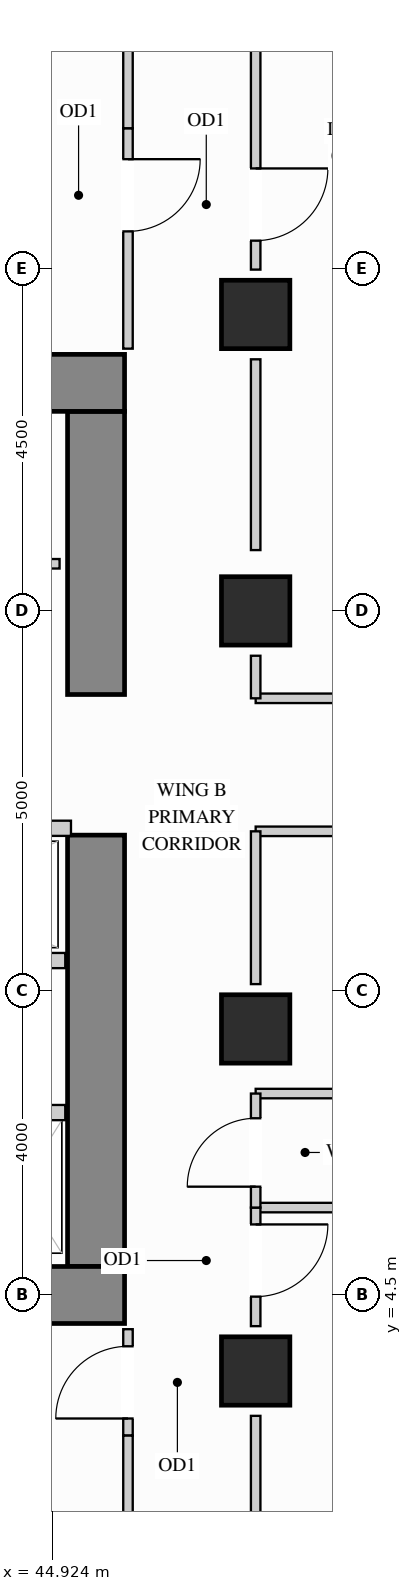
"""IFC4 building model, lengths in metres.
Left out: names, types, materials, properties, quantities, classifications, styles, units other than length and angle.
Written with IfcOpenShell. Run it as: python <this file> out.ifc"""

import sys

from ifc_helpers import new_model, si_unit, direction, frame, frame_2d, origin, origin_2d, place, context, subcontext, project, spatial, rectangle, extrude, source, transform, mapped, element, fill, save


model = new_model("IFC4")
c1 = context("Model", 3, precision=1e-05, world=origin(), true_north=direction((0.0, 1.0)))
c2 = subcontext(c1, "Body", "Model", "MODEL_VIEW")
j1 = project(units=[si_unit("LENGTHUNIT", "METRE"), si_unit("PLANEANGLEUNIT", "RADIAN")], contexts=[c1])
p1 = place(None, origin())
s1 = spatial("IfcSite", under=j1, at=p1, CompositionType="ELEMENT")
p2 = place(p1, origin())
s2 = spatial("IfcBuilding", under=s1, at=p2, CompositionType="ELEMENT")
p3 = place(p2, frame((0.0, 0.0, 95.4)))
s3 = spatial("IfcBuildingStorey", under=s2, at=p3, CompositionType="ELEMENT", Elevation=95.4)
m1 = source(origin(), c2, "Body", "SweptSolid", [
    extrude(rectangle(XDim=0.9, YDim=0.9, at=origin_2d()), origin(), (0.0, 0.0, 1.0), 3.38),
])
for number, where, z_axis, x_axis in (
    (1, (47.6, 13.5, 0.0), (0.0, 0.0, 1.0), (1.0, 0.0, 0.0)),
    (2, (47.6, 3.5, 0.0), (0.0, 0.0, 1.0), (1.0, 0.0, 0.0)),
    (3, (47.6, 8.0, 0.0), (0.0, 0.0, 1.0), (1.0, 0.0, 0.0)),
    (4, (47.6, 17.4, 0.0), (0.0, 0.0, 1.0), (1.0, 0.0, 0.0)),
):
    element("IfcColumn", number, at=place(p3, frame(where, z_axis=z_axis, x_axis=x_axis)), inside=s3, PredefinedType="COLUMN", context=c2, shape_type="MappedRepresentation", body=[
        mapped(m1, transform((0.0, 0.0, 0.0), x_axis=(1.0, 0.0, 0.0), y_axis=(0.0, 1.0, 0.0), z_axis=(0.0, 0.0, 1.0))),
    ])
m2 = source(origin(), c2, "Body", "SweptSolid", [
    extrude(rectangle(XDim=5.675, YDim=0.75, at=frame_2d((2.837, 0.0))), origin(), (0.0, 0.0, 1.0), 3.38),
])
p4 = place(p3, frame((45.5, 4.875, 0.0), z_axis=(0.0, 0.0, 1.0), x_axis=(0.0, 1.0, 0.0)))
e5 = element("IfcWall", 5, at=p4, inside=s3, PredefinedType="SHEAR", context=c2, shape_type="MappedRepresentation", body=[
    mapped(m2, transform((0.0, 0.0, 0.0), x_axis=(1.0, 0.0, 0.0), y_axis=(0.0, 1.0, 0.0), z_axis=(0.0, 0.0, 1.0))),
])
m3 = source(origin(), c2, "Body", "SweptSolid", [
    extrude(rectangle(XDim=3.725, YDim=0.75, at=frame_2d((1.863, 0.0))), origin(), (0.0, 0.0, 1.0), 3.38),
])
p5 = place(p3, frame((45.5, 12.4, 0.0), z_axis=(0.0, 0.0, 1.0), x_axis=(0.0, 1.0, 0.0)))
e6 = element("IfcWall", 6, at=p5, inside=s3, PredefinedType="SHEAR", context=c2, shape_type="MappedRepresentation", body=[
    mapped(m3, transform((0.0, 0.0, 0.0), x_axis=(1.0, 0.0, 0.0), y_axis=(0.0, 1.0, 0.0), z_axis=(0.0, 0.0, 1.0))),
])
m4 = source(origin(), c2, "Body", "SweptSolid", [
    extrude(rectangle(XDim=10.25, YDim=0.75, at=frame_2d((5.125, 0.0))), origin(), (0.0, 0.0, 1.0), 3.38),
])
for number, where, z_axis, x_axis in (
    (7, (35.625, 16.5, 0.0), (0.0, 0.0, 1.0), (1.0, 0.0, 0.0)),
    (8, (35.625, 4.5, 0.0), (0.0, 0.0, 1.0), (1.0, 0.0, 0.0)),
):
    element("IfcWall", number, at=place(p3, frame(where, z_axis=z_axis, x_axis=x_axis)), inside=s3, PredefinedType="SHEAR", context=c2, shape_type="MappedRepresentation", body=[
        mapped(m4, transform((0.0, 0.0, 0.0), x_axis=(1.0, 0.0, 0.0), y_axis=(0.0, 1.0, 0.0), z_axis=(0.0, 0.0, 1.0))),
    ])
p6 = place(p3, frame((40.75, 14.12, 0.0), z_axis=(0.0, 0.0, 1.0), x_axis=(1.0, 0.0, 0.0)))
e9 = element("IfcWall", 9, at=p6, inside=s3, PredefinedType="PARTITIONING", context=c2, shape_type="SweptSolid", body=[
    extrude(rectangle(XDim=4.27, YDim=0.125, at=frame_2d((2.135, 0.0))), origin(), (0.0, 0.0, 1.0), 3.365),
])
p7 = place(p6, frame((1.66, 0.0, 0.0)))
e10 = element("IfcOpeningElement", 10, at=p7, cuts=e9, PredefinedType="OPENING", context=c2, shape_type="SweptSolid", body=[
    extrude(rectangle(XDim=0.95, YDim=2.15, at=frame_2d((0.475, 1.075))), frame((0.0, 0.073, 0.0), z_axis=(0.0, -1.0, 0.0), x_axis=(1.0, 0.0, 0.0)), (0.0, 0.0, 1.0), 0.145),
])
m5 = source(origin(), c2, "Body", "SweptSolid", [
    extrude(rectangle(XDim=8.048, YDim=0.125, at=frame_2d((4.024, 0.0))), origin(), (0.0, 0.0, 1.0), 3.365),
])
for number, where, z_axis, x_axis in (
    (11, (47.6, 5.65, 0.0), (0.0, 0.0, 1.0), (1.0, 0.0, 0.0)),
    (12, (47.6, 7.15, 0.0), (0.0, 0.0, 1.0), (1.0, 0.0, 0.0)),
):
    element("IfcWall", number, at=place(p3, frame(where, z_axis=z_axis, x_axis=x_axis)), inside=s3, PredefinedType="PARTITIONING", context=c2, shape_type="MappedRepresentation", body=[
        mapped(m5, transform((0.0, 0.0, 0.0), x_axis=(1.0, 0.0, 0.0), y_axis=(0.0, 1.0, 0.0), z_axis=(0.0, 0.0, 1.0))),
    ])
m6 = source(origin(), c2, "Body", "SweptSolid", [
    extrude(rectangle(XDim=3.8, YDim=0.125, at=frame_2d((1.9, 0.0))), origin(), (0.0, 0.0, 1.0), 3.365),
])
p8 = place(p3, frame((47.6, 12.35, 0.0), z_axis=(0.0, 0.0, 1.0), x_axis=(1.0, 0.0, 0.0)))
e13 = element("IfcWall", 13, at=p8, inside=s3, PredefinedType="PARTITIONING", context=c2, shape_type="MappedRepresentation", body=[
    mapped(m6, transform((0.0, 0.0, 0.0), x_axis=(1.0, 0.0, 0.0), y_axis=(0.0, 1.0, 0.0), z_axis=(0.0, 0.0, 1.0))),
])
p9 = place(p3, frame((47.6, 10.6, 0.0), z_axis=(0.0, 0.0, 1.0), x_axis=(1.0, 0.0, 0.0)))
e14 = element("IfcWall", 14, at=p9, inside=s3, PredefinedType="PARTITIONING", context=c2, shape_type="SweptSolid", body=[
    extrude(rectangle(XDim=3.8, YDim=0.125, at=frame_2d((1.9, 0.0))), origin(), (0.0, 0.0, 1.0), 2.677),
])
p10 = place(p9, frame((1.425, 0.0, 0.0)))
e15 = element("IfcOpeningElement", 15, at=p10, cuts=e14, PredefinedType="OPENING", context=c2, shape_type="SweptSolid", body=[
    extrude(rectangle(XDim=0.95, YDim=2.15, at=frame_2d((0.475, 1.075))), frame((0.0, 0.073, 0.0), z_axis=(0.0, -1.0, 0.0), x_axis=(1.0, 0.0, 0.0)), (0.0, 0.0, 1.0), 0.145),
])
p11 = place(p3, frame((47.6, 4.09, 0.0), z_axis=(0.0, 0.0, 1.0), x_axis=(0.0, 1.0, 0.0)))
e16 = element("IfcWall", 16, at=p11, inside=s3, PredefinedType="PARTITIONING", context=c2, shape_type="SweptSolid", body=[
    extrude(rectangle(XDim=1.56, YDim=0.125, at=frame_2d((0.78, 0.0))), origin(), (0.0, 0.0, 1.0), 2.677),
])
p12 = place(p11, frame((0.388, 0.0, 0.0)))
e17 = element("IfcOpeningElement", 17, at=p12, cuts=e16, PredefinedType="OPENING", context=c2, shape_type="SweptSolid", body=[
    extrude(rectangle(XDim=0.95, YDim=2.15, at=frame_2d((0.475, 1.075))), frame((0.0, 0.073, 0.0), z_axis=(0.0, -1.0, 0.0), x_axis=(1.0, 0.0, 0.0)), (0.0, 0.0, 1.0), 0.145),
])
m7 = source(origin(), c2, "Body", "SweptSolid", [
    extrude(rectangle(XDim=1.72, YDim=0.125, at=frame_2d((0.86, 0.0))), origin(), (0.0, 0.0, 1.0), 2.677),
])
p13 = place(p3, frame((47.6, 1.19, 0.0), z_axis=(0.0, 0.0, 1.0), x_axis=(0.0, 1.0, 0.0)))
e18 = element("IfcWall", 18, at=p13, inside=s3, PredefinedType="PARTITIONING", context=c2, shape_type="MappedRepresentation", body=[
    mapped(m7, transform((0.0, 0.0, 0.0), x_axis=(1.0, 0.0, 0.0), y_axis=(0.0, 1.0, 0.0), z_axis=(0.0, 0.0, 1.0))),
])
m8 = source(origin(), c2, "Body", "SweptSolid", [
    extrude(rectangle(XDim=2.01, YDim=0.125, at=frame_2d((1.005, 0.0))), origin(), (0.0, 0.0, 1.0), 2.677),
])
p14 = place(p3, frame((47.6, 8.59, 0.0), z_axis=(0.0, 0.0, 1.0), x_axis=(0.0, 1.0, 0.0)))
e19 = element("IfcWall", 19, at=p14, inside=s3, PredefinedType="PARTITIONING", context=c2, shape_type="MappedRepresentation", body=[
    mapped(m8, transform((0.0, 0.0, 0.0), x_axis=(1.0, 0.0, 0.0), y_axis=(0.0, 1.0, 0.0), z_axis=(0.0, 0.0, 1.0))),
])
m9 = source(origin(), c2, "Body", "SweptSolid", [
    extrude(rectangle(XDim=2.51, YDim=0.125, at=frame_2d((1.255, 0.0))), origin(), (0.0, 0.0, 1.0), 2.677),
])
p15 = place(p3, frame((47.6, 14.3, 0.0), z_axis=(0.0, 0.0, 1.0), x_axis=(0.0, 1.0, 0.0)))
e20 = element("IfcWall", 20, at=p15, inside=s3, PredefinedType="PARTITIONING", context=c2, shape_type="MappedRepresentation", body=[
    mapped(m9, transform((0.0, 0.0, 0.0), x_axis=(1.0, 0.0, 0.0), y_axis=(0.0, 1.0, 0.0), z_axis=(0.0, 0.0, 1.0))),
])
p16 = place(p3, frame((47.6, 17.99, 0.0), z_axis=(0.0, 0.0, 1.0), x_axis=(0.0, 1.0, 0.0)))
e21 = element("IfcWall", 21, at=p16, inside=s3, PredefinedType="PARTITIONING", context=c2, shape_type="SweptSolid", body=[
    extrude(rectangle(XDim=3.32, YDim=0.125, at=frame_2d((1.66, 0.0))), origin(), (0.0, 0.0, 1.0), 2.677),
])
p17 = place(p16, frame((0.381, 0.0, 0.0)))
e22 = element("IfcOpeningElement", 22, at=p17, cuts=e21, PredefinedType="OPENING", context=c2, shape_type="SweptSolid", body=[
    extrude(rectangle(XDim=0.95, YDim=2.15, at=frame_2d((0.475, 1.075))), frame((0.0, 0.073, 0.0), z_axis=(0.0, -1.0, 0.0), x_axis=(1.0, 0.0, 0.0)), (0.0, 0.0, 1.0), 0.145),
])
m10 = source(origin(), c2, "Body", "SweptSolid", [
    extrude(rectangle(XDim=0.56, YDim=0.125, at=frame_2d((0.28, 0.0))), origin(), (0.0, 0.0, 1.0), 2.677),
])
p18 = place(p3, frame((47.6, 12.35, 0.0), z_axis=(0.0, 0.0, 1.0), x_axis=(0.0, 1.0, 0.0)))
e23 = element("IfcWall", 23, at=p18, inside=s3, PredefinedType="PARTITIONING", context=c2, shape_type="MappedRepresentation", body=[
    mapped(m10, transform((0.0, 0.0, 0.0), x_axis=(1.0, 0.0, 0.0), y_axis=(0.0, 1.0, 0.0), z_axis=(0.0, 0.0, 1.0))),
])
p19 = place(p3, frame((47.6, 5.65, 0.0), z_axis=(0.0, 0.0, 1.0), x_axis=(0.0, 1.0, 0.0)))
e24 = element("IfcWall", 24, at=p19, inside=s3, PredefinedType="PARTITIONING", context=c2, shape_type="SweptSolid", body=[
    extrude(rectangle(XDim=1.5, YDim=0.125, at=frame_2d((0.75, 0.0))), origin(), (0.0, 0.0, 1.0), 2.677),
])
p20 = place(p19, frame((0.275, 0.0, 0.0)))
e25 = element("IfcOpeningElement", 25, at=p20, cuts=e24, PredefinedType="OPENING", context=c2, shape_type="SweptSolid", body=[
    extrude(rectangle(XDim=0.9, YDim=2.15, at=frame_2d((0.45, 1.075))), frame((0.0, 0.073, 0.0), z_axis=(0.0, -1.0, 0.0), x_axis=(1.0, 0.0, 0.0)), (0.0, 0.0, 1.0), 0.145),
])
p21 = place(p3, frame((45.92, 16.95, 0.0), z_axis=(0.0, 0.0, 1.0), x_axis=(0.0, 1.0, 0.0)))
e26 = element("IfcWall", 26, at=p21, inside=s3, PredefinedType="PARTITIONING", context=c2, shape_type="SweptSolid", body=[
    extrude(rectangle(XDim=2.9, YDim=0.125, at=frame_2d((1.45, 0.0))), origin(), (0.0, 0.0, 1.0), 3.365),
])
p22 = place(p21, frame((1.543, 0.0, 0.0)))
e27 = element("IfcOpeningElement", 27, at=p22, cuts=e26, PredefinedType="OPENING", context=c2, shape_type="SweptSolid", body=[
    extrude(rectangle(XDim=0.95, YDim=2.15, at=frame_2d((0.475, 1.075))), frame((0.0, 0.073, 0.0), z_axis=(0.0, -1.0, 0.0), x_axis=(1.0, 0.0, 0.0)), (0.0, 0.0, 1.0), 0.145),
])
m11 = source(origin(), c2, "Body", "SweptSolid", [
    extrude(rectangle(XDim=2.298, YDim=0.125, at=frame_2d((1.149, 0.0))), origin(), (0.0, 0.0, 1.0), 3.365),
])
p23 = place(p3, frame((45.92, 19.85, 0.0), z_axis=(0.0, 0.0, 1.0), x_axis=(0.0, 1.0, 0.0)))
e28 = element("IfcWall", 28, at=p23, inside=s3, PredefinedType="PARTITIONING", context=c2, shape_type="MappedRepresentation", body=[
    mapped(m11, transform((0.0, 0.0, 0.0), x_axis=(1.0, 0.0, 0.0), y_axis=(0.0, 1.0, 0.0), z_axis=(0.0, 0.0, 1.0))),
])
p24 = place(p3, frame((45.92, 2.65, 0.0), z_axis=(0.0, 0.0, 1.0), x_axis=(0.0, 1.0, 0.0)))
e29 = element("IfcWall", 29, at=p24, inside=s3, PredefinedType="PARTITIONING", context=c2, shape_type="SweptSolid", body=[
    extrude(rectangle(XDim=1.4, YDim=0.125, at=frame_2d((0.7, 0.0))), origin(), (0.0, 0.0, 1.0), 3.365),
])
p25 = place(p24, frame((0.225, 0.0, 0.0)))
e30 = element("IfcOpeningElement", 30, at=p25, cuts=e29, PredefinedType="OPENING", context=c2, shape_type="SweptSolid", body=[
    extrude(rectangle(XDim=0.95, YDim=2.15, at=frame_2d((0.475, 1.075))), frame((0.0, 0.073, 0.0), z_axis=(0.0, -1.0, 0.0), x_axis=(1.0, 0.0, 0.0)), (0.0, 0.0, 1.0), 0.145),
])
p26 = place(p3, frame((45.92, 0.352, 0.0), z_axis=(0.0, 0.0, 1.0), x_axis=(0.0, 1.0, 0.0)))
e31 = element("IfcWall", 31, at=p26, inside=s3, PredefinedType="PARTITIONING", context=c2, shape_type="MappedRepresentation", body=[
    mapped(m11, transform((0.0, 0.0, 0.0), x_axis=(1.0, 0.0, 0.0), y_axis=(0.0, 1.0, 0.0), z_axis=(0.0, 0.0, 1.0))),
])
m12 = source(origin(), c2, "Body", "SweptSolid", [
    extrude(rectangle(XDim=1.245, YDim=0.2, at=frame_2d((0.623, 0.0))), origin(), (0.0, 0.0, 1.0), 3.365),
])
p27 = place(p3, frame((43.85, 6.9, 0.0), z_axis=(0.0, 0.0, 1.0), x_axis=(1.0, 0.0, 0.0)))
e32 = element("IfcWall", 32, at=p27, inside=s3, PredefinedType="PARTITIONING", context=c2, shape_type="MappedRepresentation", body=[
    mapped(m12, transform((0.0, 0.0, 0.0), x_axis=(1.0, 0.0, 0.0), y_axis=(0.0, 1.0, 0.0), z_axis=(0.0, 0.0, 1.0))),
])
m13 = source(origin(), c2, "Body", "SweptSolid", [
    extrude(rectangle(XDim=3.49, YDim=0.2, at=frame_2d((1.745, 0.0))), origin(), (0.0, 0.0, 1.0), 3.365),
])
p28 = place(p3, frame((41.68, 10.64, 0.0), z_axis=(0.0, 0.0, 1.0), x_axis=(1.0, 0.0, 0.0)))
e33 = element("IfcWall", 33, at=p28, inside=s3, PredefinedType="PARTITIONING", context=c2, shape_type="MappedRepresentation", body=[
    mapped(m13, transform((0.0, 0.0, 0.0), x_axis=(1.0, 0.0, 0.0), y_axis=(0.0, 1.0, 0.0), z_axis=(0.0, 0.0, 1.0))),
])
m14 = source(origin(), c2, "Body", "SweptSolid", [
    extrude(rectangle(XDim=3.415, YDim=0.2, at=frame_2d((1.708, 0.0))), origin(), (0.0, 0.0, 1.0), 3.365),
])
p29 = place(p3, frame((41.68, 8.9, 0.0), z_axis=(0.0, 0.0, 1.0), x_axis=(1.0, 0.0, 0.0)))
e34 = element("IfcWall", 34, at=p29, inside=s3, PredefinedType="PARTITIONING", context=c2, shape_type="MappedRepresentation", body=[
    mapped(m14, transform((0.0, 0.0, 0.0), x_axis=(1.0, 0.0, 0.0), y_axis=(0.0, 1.0, 0.0), z_axis=(0.0, 0.0, 1.0))),
])
m15 = source(origin(), c2, "Body", "SweptSolid", [
    extrude(rectangle(XDim=0.95, YDim=2.15, at=frame_2d((0.475, 1.075))), frame((0.0, 0.025, 0.0), z_axis=(0.0, -1.0, 0.0), x_axis=(1.0, 0.0, 0.0)), (0.0, 0.0, 1.0), 0.05),
])
p30 = place(p22, origin())
e35 = element("IfcDoor", 35, at=p30, inside=s3, OperationType="SINGLE_SWING_RIGHT", PredefinedType="DOOR", context=c2, shape_type="MappedRepresentation", body=[
    mapped(m15, transform((0.0, 0.0, 0.0), x_axis=(1.0, 0.0, 0.0), y_axis=(0.0, 1.0, 0.0), z_axis=(0.0, 0.0, 1.0))),
])
fill(e27, e35)
p31 = place(p25, origin())
e36 = element("IfcDoor", 36, at=p31, inside=s3, OperationType="SINGLE_SWING_LEFT", PredefinedType="DOOR", context=c2, shape_type="MappedRepresentation", body=[
    mapped(m15, transform((0.0, 0.0, 0.0), x_axis=(1.0, 0.0, 0.0), y_axis=(0.0, 1.0, 0.0), z_axis=(0.0, 0.0, 1.0))),
])
fill(e30, e36)
p32 = place(p12, origin())
e37 = element("IfcDoor", 37, at=p32, inside=s3, OperationType="SINGLE_SWING_RIGHT", PredefinedType="DOOR", context=c2, shape_type="MappedRepresentation", body=[
    mapped(m15, transform((0.0, 0.0, 0.0), x_axis=(1.0, 0.0, 0.0), y_axis=(0.0, 1.0, 0.0), z_axis=(0.0, 0.0, 1.0))),
])
fill(e17, e37)
p33 = place(p17, origin())
e38 = element("IfcDoor", 38, at=p33, inside=s3, OperationType="SINGLE_SWING_RIGHT", PredefinedType="DOOR", context=c2, shape_type="MappedRepresentation", body=[
    mapped(m15, transform((0.0, 0.0, 0.0), x_axis=(1.0, 0.0, 0.0), y_axis=(0.0, 1.0, 0.0), z_axis=(0.0, 0.0, 1.0))),
])
fill(e22, e38)
m16 = source(origin(), c2, "Body", "SweptSolid", [
    extrude(rectangle(XDim=0.9, YDim=2.15, at=frame_2d((0.45, 1.075))), frame((0.0, 0.025, 0.0), z_axis=(0.0, -1.0, 0.0), x_axis=(1.0, 0.0, 0.0)), (0.0, 0.0, 1.0), 0.05),
])
p34 = place(p20, origin())
e39 = element("IfcDoor", 39, at=p34, inside=s3, OperationType="SINGLE_SWING_LEFT", PredefinedType="DOOR", context=c2, shape_type="MappedRepresentation", body=[
    mapped(m16, transform((0.0, 0.0, 0.0), x_axis=(1.0, 0.0, 0.0), y_axis=(0.0, 1.0, 0.0), z_axis=(0.0, 0.0, 1.0))),
])
fill(e25, e39)
save(model, sys.argv[1])
